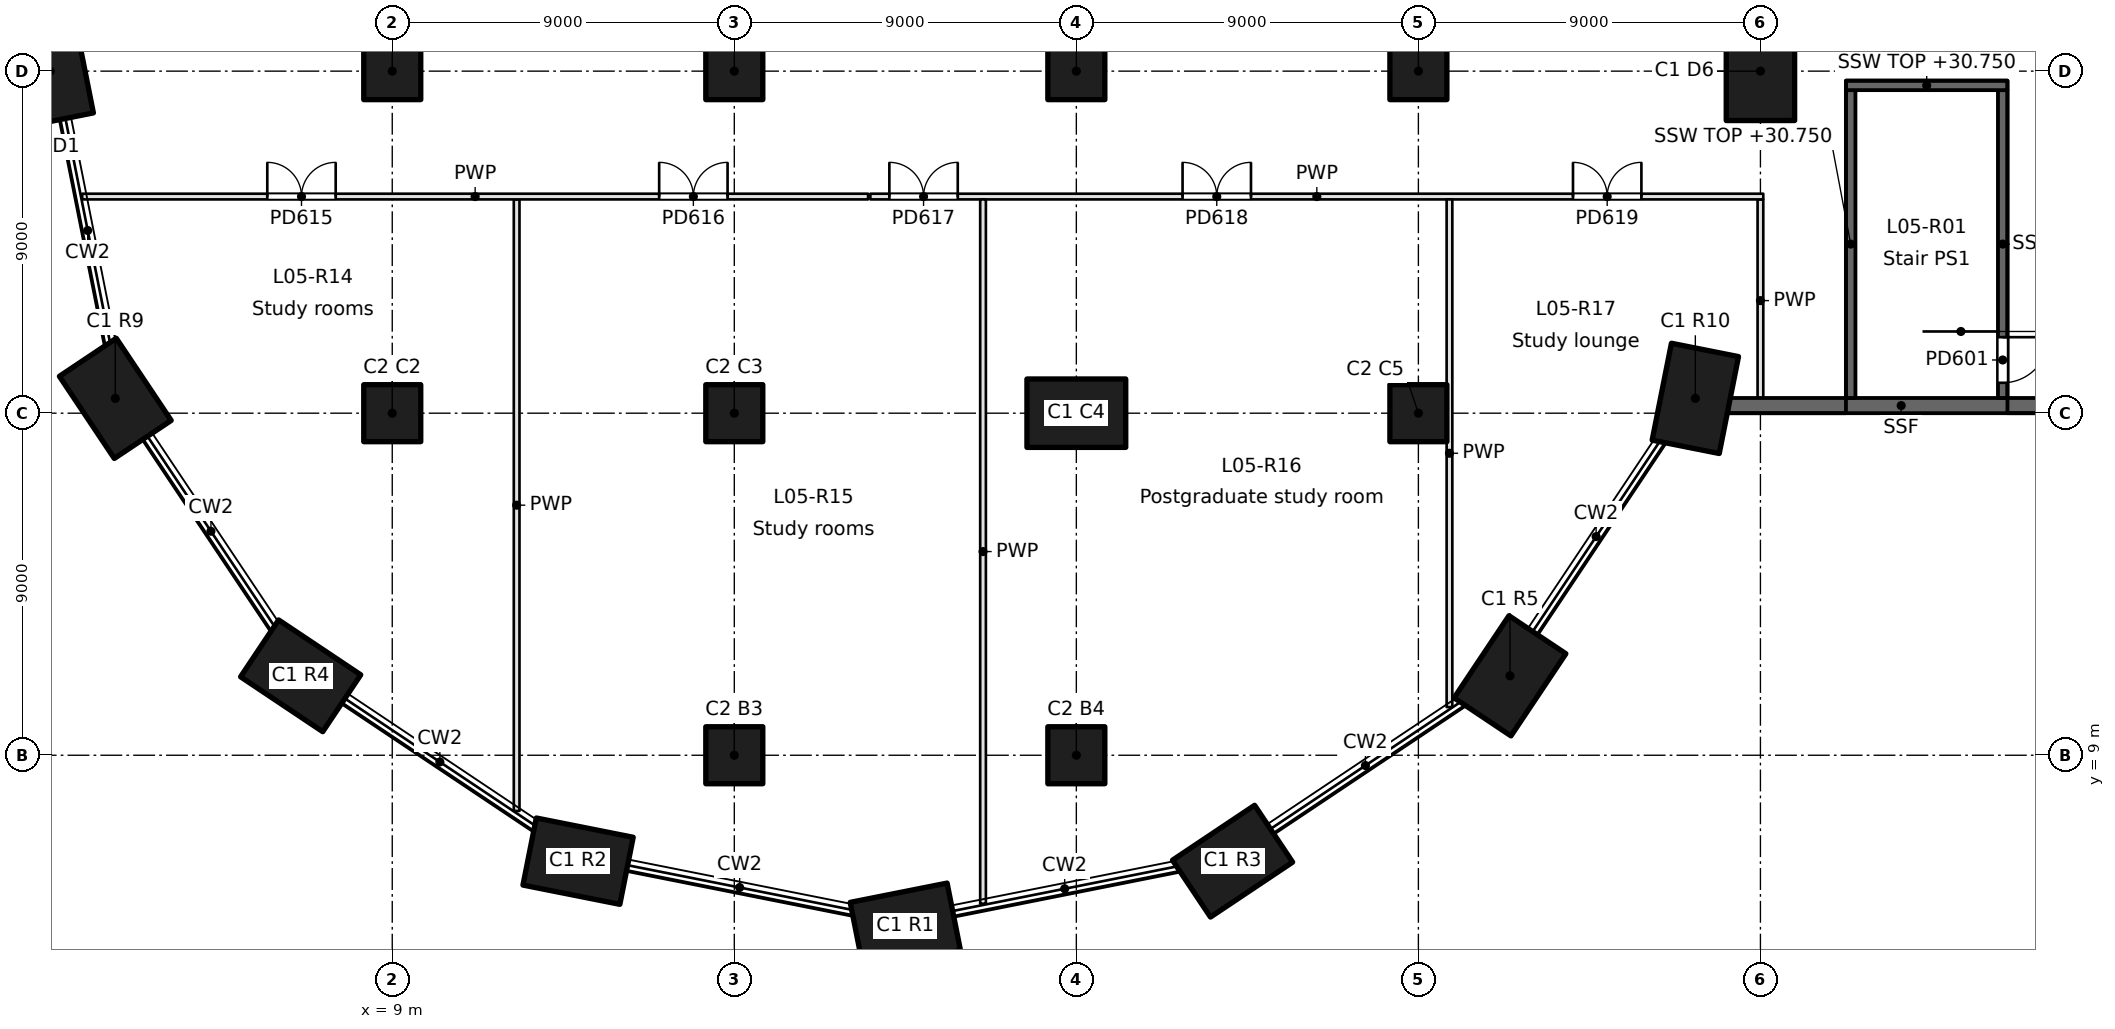
"""IFC4 building model, lengths in metres.
Left out: names, types, materials, properties, quantities, classifications, styles, units other than length and angle.
Written with IfcOpenShell. Run it as: python <this file> out.ifc"""

import sys

from ifc_helpers import new_model, si_unit, direction, frame, frame_2d, origin, origin_2d, place, context, subcontext, project, spatial, rectangle, extrude, element, fill, save


model = new_model("IFC4")
c1 = context("Model", 3, precision=1e-05, world=origin(), true_north=direction((0.0, 1.0)))
c2 = subcontext(c1, "Body", "Model", "MODEL_VIEW")
j1 = project(units=[si_unit("LENGTHUNIT", "METRE"), si_unit("PLANEANGLEUNIT", "RADIAN")], contexts=[c1])
p1 = place(None, origin())
s1 = spatial("IfcSite", under=j1, at=p1, CompositionType="ELEMENT")
p2 = place(p1, origin())
s2 = spatial("IfcBuilding", under=s1, at=p2, CompositionType="ELEMENT")
p3 = place(p2, frame((0.0, 0.0, 26.4)))
s3 = spatial("IfcBuildingStorey", under=s2, at=p3, CompositionType="ELEMENT", Elevation=26.4)
for number, where, z_axis, x_axis in (
    (1, (22.5, 4.5, 0.0), (0.0, 0.0, 1.0), (0.981, 0.195, 0.0)),
    (2, (13.89, 6.213, 0.0), (0.0, 0.0, 1.0), (-0.981, 0.195, 0.0)),
    (3, (31.11, 6.213, 0.0), (0.0, 0.0, 1.0), (0.831, 0.556, 0.0)),
    (4, (6.59, 11.09, 0.0), (0.0, 0.0, 1.0), (-0.831, 0.556, 0.0)),
    (5, (38.41, 11.09, 0.0), (0.0, 0.0, 1.0), (0.556, 0.831, 0.0)),
    (6, (1.713, 18.39, 0.0), (0.0, 0.0, 1.0), (-0.556, 0.831, 0.0)),
    (7, (43.287, 18.39, 0.0), (0.0, 0.0, 1.0), (0.195, 0.981, 0.0)),
    (8, (0.0, 27.0, 0.0), (0.0, 0.0, 1.0), (-0.195, 0.981, 0.0)),
    (9, (45.0, 27.0, 0.0), (0.0, 0.0, 1.0), (0.0, 1.0, 0.0)),
):
    element("IfcColumn", number, at=place(p3, frame(where, z_axis=z_axis, x_axis=x_axis)), inside=s3, PredefinedType="COLUMN", context=c2, shape_type="SweptSolid", body=[
        extrude(rectangle(XDim=2.6, YDim=1.8, at=origin_2d()), origin(), (0.0, 0.0, 1.0), 4.8),
    ])
for number, where, z_axis, x_axis in (
    (10, (9.0, 18.0, 0.0), (0.0, 0.0, 1.0), (1.0, 0.0, 0.0)),
    (11, (9.0, 27.0, 0.0), (0.0, 0.0, 1.0), (1.0, 0.0, 0.0)),
    (12, (18.0, 18.0, 0.0), (0.0, 0.0, 1.0), (1.0, 0.0, 0.0)),
    (13, (18.0, 27.0, 0.0), (0.0, 0.0, 1.0), (1.0, 0.0, 0.0)),
):
    element("IfcColumn", number, at=place(p3, frame(where, z_axis=z_axis, x_axis=x_axis)), inside=s3, PredefinedType="COLUMN", context=c2, shape_type="SweptSolid", body=[
        extrude(rectangle(XDim=1.5, YDim=1.5, at=origin_2d()), origin(), (0.0, 0.0, 1.0), 4.8),
    ])
p4 = place(p3, frame((27.0, 18.0, 0.0), z_axis=(0.0, 0.0, 1.0), x_axis=(1.0, 0.0, 0.0)))
e14 = element("IfcColumn", 14, at=p4, inside=s3, PredefinedType="COLUMN", context=c2, shape_type="SweptSolid", body=[
    extrude(rectangle(XDim=2.6, YDim=1.8, at=origin_2d()), origin(), (0.0, 0.0, 1.0), 4.8),
])
for number, where, z_axis, x_axis in (
    (15, (27.0, 27.0, 0.0), (0.0, 0.0, 1.0), (1.0, 0.0, 0.0)),
    (16, (36.0, 18.0, 0.0), (0.0, 0.0, 1.0), (1.0, 0.0, 0.0)),
    (17, (36.0, 27.0, 0.0), (0.0, 0.0, 1.0), (1.0, 0.0, 0.0)),
    (18, (18.0, 9.0, 0.0), (0.0, 0.0, 1.0), (1.0, 0.0, 0.0)),
    (19, (27.0, 9.0, 0.0), (0.0, 0.0, 1.0), (1.0, 0.0, 0.0)),
):
    element("IfcColumn", number, at=place(p3, frame(where, z_axis=z_axis, x_axis=x_axis)), inside=s3, PredefinedType="COLUMN", context=c2, shape_type="SweptSolid", body=[
        extrude(rectangle(XDim=1.5, YDim=1.5, at=origin_2d()), origin(), (0.0, 0.0, 1.0), 4.8),
    ])
p5 = place(p3, frame((47.375, 18.4, 0.0), z_axis=(0.0, 0.0, 1.0), x_axis=(0.0, 1.0, 0.0)))
e20 = element("IfcWall", 20, at=p5, inside=s3, PredefinedType="SOLIDWALL", context=c2, shape_type="SweptSolid", body=[
    extrude(rectangle(XDim=8.1, YDim=0.25, at=frame_2d((4.05, 0.0))), origin(), (0.0, 0.0, 1.0), 4.35),
])
p6 = place(p3, frame((51.375, 26.5, 0.0), z_axis=(0.0, 0.0, 1.0), x_axis=(0.0, -1.0, 0.0)))
e21 = element("IfcWall", 21, at=p6, inside=s3, PredefinedType="SOLIDWALL", context=c2, shape_type="SweptSolid", body=[
    extrude(rectangle(XDim=8.1, YDim=0.25, at=frame_2d((4.05, 0.0))), origin(), (0.0, 0.0, 1.0), 4.35),
])
p7 = place(p6, frame((6.5, 0.0, 0.0)))
e22 = element("IfcOpeningElement", 22, at=p7, cuts=e21, PredefinedType="OPENING", context=c2, shape_type="SweptSolid", body=[
    extrude(rectangle(XDim=1.2, YDim=2.1, at=frame_2d((0.6, 1.05))), frame((0.0, 0.125, 0.0), z_axis=(0.0, -1.0, 0.0), x_axis=(1.0, 0.0, 0.0)), (0.0, 0.0, 1.0), 0.25),
])
p8 = place(p3, frame((47.25, 26.625, 0.0), z_axis=(0.0, 0.0, 1.0), x_axis=(1.0, 0.0, 0.0)))
e23 = element("IfcWall", 23, at=p8, inside=s3, PredefinedType="SOLIDWALL", context=c2, shape_type="SweptSolid", body=[
    extrude(rectangle(XDim=4.25, YDim=0.25, at=frame_2d((2.125, 0.0))), origin(), (0.0, 0.0, 1.0), 4.35),
])
p9 = place(p3, frame((53.25, 18.2, 0.0), z_axis=(0.0, 0.0, 1.0), x_axis=(-1.0, 0.0, 0.0)))
e24 = element("IfcWall", 24, at=p9, inside=s3, PredefinedType="SOLIDWALL", context=c2, shape_type="SweptSolid", body=[
    extrude(rectangle(XDim=9.093, YDim=0.4, at=frame_2d((4.546, 0.0))), origin(), (0.0, 0.0, 1.0), 4.35),
])
p10 = place(p3, frame((45.0, 23.625, 0.0), z_axis=(0.0, 0.0, 1.0), x_axis=(0.0, -1.0, 0.0)))
e25 = element("IfcWall", 25, at=p10, inside=s3, PredefinedType="PARTITIONING", context=c2, shape_type="SweptSolid", body=[
    extrude(rectangle(XDim=5.325, YDim=0.15, at=frame_2d((2.663, 0.0))), origin(), (0.0, 0.0, 1.0), 4.35),
])
p11 = place(p3, frame((12.273, 7.534, 0.0), z_axis=(0.0, 0.0, 1.0), x_axis=(0.0, 1.0, 0.0)))
e26 = element("IfcWall", 26, at=p11, inside=s3, PredefinedType="PARTITIONING", context=c2, shape_type="SweptSolid", body=[
    extrude(rectangle(XDim=16.091, YDim=0.15, at=frame_2d((8.045, 0.0))), origin(), (0.0, 0.0, 1.0), 4.35),
])
p12 = place(p3, frame((0.842, 23.7, 0.0), z_axis=(0.0, 0.0, 1.0), x_axis=(1.0, 0.0, 0.0)))
e27 = element("IfcWall", 27, at=p12, inside=s3, PredefinedType="PARTITIONING", context=c2, shape_type="SweptSolid", body=[
    extrude(rectangle(XDim=20.678, YDim=0.15, at=frame_2d((10.339, 0.0))), origin(), (0.0, 0.0, 1.0), 4.35),
])
p13 = place(p12, frame((4.87, 0.0, 0.0)))
e28 = element("IfcOpeningElement", 28, at=p13, cuts=e27, PredefinedType="OPENING", context=c2, shape_type="SweptSolid", body=[
    extrude(rectangle(XDim=1.8, YDim=2.1, at=frame_2d((0.9, 1.05))), frame((0.0, 0.075, 0.0), z_axis=(0.0, -1.0, 0.0), x_axis=(1.0, 0.0, 0.0)), (0.0, 0.0, 1.0), 0.15),
])
p14 = place(p12, frame((15.181, 0.0, 0.0)))
e29 = element("IfcOpeningElement", 29, at=p14, cuts=e27, PredefinedType="OPENING", context=c2, shape_type="SweptSolid", body=[
    extrude(rectangle(XDim=1.8, YDim=2.1, at=frame_2d((0.9, 1.05))), frame((0.0, 0.075, 0.0), z_axis=(0.0, -1.0, 0.0), x_axis=(1.0, 0.0, 0.0)), (0.0, 0.0, 1.0), 0.15),
])
p15 = place(p3, frame((21.58, 23.7, 0.0), z_axis=(0.0, 0.0, 1.0), x_axis=(1.0, 0.0, 0.0)))
e30 = element("IfcWall", 30, at=p15, inside=s3, PredefinedType="PARTITIONING", context=c2, shape_type="SweptSolid", body=[
    extrude(rectangle(XDim=23.495, YDim=0.15, at=frame_2d((11.748, 0.0))), origin(), (0.0, 0.0, 1.0), 4.35),
])
p16 = place(p15, frame((0.5, 0.0, 0.0)))
e31 = element("IfcOpeningElement", 31, at=p16, cuts=e30, PredefinedType="OPENING", context=c2, shape_type="SweptSolid", body=[
    extrude(rectangle(XDim=1.8, YDim=2.1, at=frame_2d((0.9, 1.05))), frame((0.0, 0.075, 0.0), z_axis=(0.0, -1.0, 0.0), x_axis=(1.0, 0.0, 0.0)), (0.0, 0.0, 1.0), 0.15),
])
p17 = place(p15, frame((8.215, 0.0, 0.0)))
e32 = element("IfcOpeningElement", 32, at=p17, cuts=e30, PredefinedType="OPENING", context=c2, shape_type="SweptSolid", body=[
    extrude(rectangle(XDim=1.8, YDim=2.1, at=frame_2d((0.9, 1.05))), frame((0.0, 0.075, 0.0), z_axis=(0.0, -1.0, 0.0), x_axis=(1.0, 0.0, 0.0)), (0.0, 0.0, 1.0), 0.15),
])
p18 = place(p15, frame((18.488, 0.0, 0.0)))
e33 = element("IfcOpeningElement", 33, at=p18, cuts=e30, PredefinedType="OPENING", context=c2, shape_type="SweptSolid", body=[
    extrude(rectangle(XDim=1.8, YDim=2.1, at=frame_2d((0.9, 1.05))), frame((0.0, 0.075, 0.0), z_axis=(0.0, -1.0, 0.0), x_axis=(1.0, 0.0, 0.0)), (0.0, 0.0, 1.0), 0.15),
])
p19 = place(p3, frame((24.545, 5.093, 0.0), z_axis=(0.0, 0.0, 1.0), x_axis=(0.0, 1.0, 0.0)))
e34 = element("IfcWall", 34, at=p19, inside=s3, PredefinedType="PARTITIONING", context=c2, shape_type="SweptSolid", body=[
    extrude(rectangle(XDim=18.532, YDim=0.15, at=frame_2d((9.266, 0.0))), origin(), (0.0, 0.0, 1.0), 4.35),
])
p20 = place(p3, frame((36.818, 10.267, 0.0), z_axis=(0.0, 0.0, 1.0), x_axis=(0.0, 1.0, 0.0)))
e35 = element("IfcWall", 35, at=p20, inside=s3, PredefinedType="PARTITIONING", context=c2, shape_type="SweptSolid", body=[
    extrude(rectangle(XDim=13.358, YDim=0.15, at=frame_2d((6.679, 0.0))), origin(), (0.0, 0.0, 1.0), 4.35),
])
p21 = place(p7, origin())
e36 = element("IfcDoor", 36, at=p21, inside=s3, OperationType="SINGLE_SWING_LEFT", PredefinedType="DOOR", context=c2, shape_type="SweptSolid", body=[
    extrude(rectangle(XDim=1.2, YDim=2.1, at=frame_2d((0.6, 1.05))), frame((0.0, 0.025, 0.0), z_axis=(0.0, -1.0, 0.0), x_axis=(1.0, 0.0, 0.0)), (0.0, 0.0, 1.0), 0.05),
])
fill(e22, e36)
p22 = place(p13, origin())
e37 = element("IfcDoor", 37, at=p22, inside=s3, OperationType="DOUBLE_DOOR_SINGLE_SWING", PredefinedType="DOOR", context=c2, shape_type="SweptSolid", body=[
    extrude(rectangle(XDim=1.8, YDim=2.1, at=frame_2d((0.9, 1.05))), frame((0.0, 0.025, 0.0), z_axis=(0.0, -1.0, 0.0), x_axis=(1.0, 0.0, 0.0)), (0.0, 0.0, 1.0), 0.05),
])
fill(e28, e37)
p23 = place(p14, origin())
e38 = element("IfcDoor", 38, at=p23, inside=s3, OperationType="DOUBLE_DOOR_SINGLE_SWING", PredefinedType="DOOR", context=c2, shape_type="SweptSolid", body=[
    extrude(rectangle(XDim=1.8, YDim=2.1, at=frame_2d((0.9, 1.05))), frame((0.0, 0.025, 0.0), z_axis=(0.0, -1.0, 0.0), x_axis=(1.0, 0.0, 0.0)), (0.0, 0.0, 1.0), 0.05),
])
fill(e29, e38)
p24 = place(p16, origin())
e39 = element("IfcDoor", 39, at=p24, inside=s3, OperationType="DOUBLE_DOOR_SINGLE_SWING", PredefinedType="DOOR", context=c2, shape_type="SweptSolid", body=[
    extrude(rectangle(XDim=1.8, YDim=2.1, at=frame_2d((0.9, 1.05))), frame((0.0, 0.025, 0.0), z_axis=(0.0, -1.0, 0.0), x_axis=(1.0, 0.0, 0.0)), (0.0, 0.0, 1.0), 0.05),
])
fill(e31, e39)
p25 = place(p17, origin())
e40 = element("IfcDoor", 40, at=p25, inside=s3, OperationType="DOUBLE_DOOR_SINGLE_SWING", PredefinedType="DOOR", context=c2, shape_type="SweptSolid", body=[
    extrude(rectangle(XDim=1.8, YDim=2.1, at=frame_2d((0.9, 1.05))), frame((0.0, 0.025, 0.0), z_axis=(0.0, -1.0, 0.0), x_axis=(1.0, 0.0, 0.0)), (0.0, 0.0, 1.0), 0.05),
])
fill(e32, e40)
p26 = place(p18, origin())
e41 = element("IfcDoor", 41, at=p26, inside=s3, OperationType="DOUBLE_DOOR_SINGLE_SWING", PredefinedType="DOOR", context=c2, shape_type="SweptSolid", body=[
    extrude(rectangle(XDim=1.8, YDim=2.1, at=frame_2d((0.9, 1.05))), frame((0.0, 0.025, 0.0), z_axis=(0.0, -1.0, 0.0), x_axis=(1.0, 0.0, 0.0)), (0.0, 0.0, 1.0), 0.05),
])
fill(e33, e41)
save(model, sys.argv[1])
